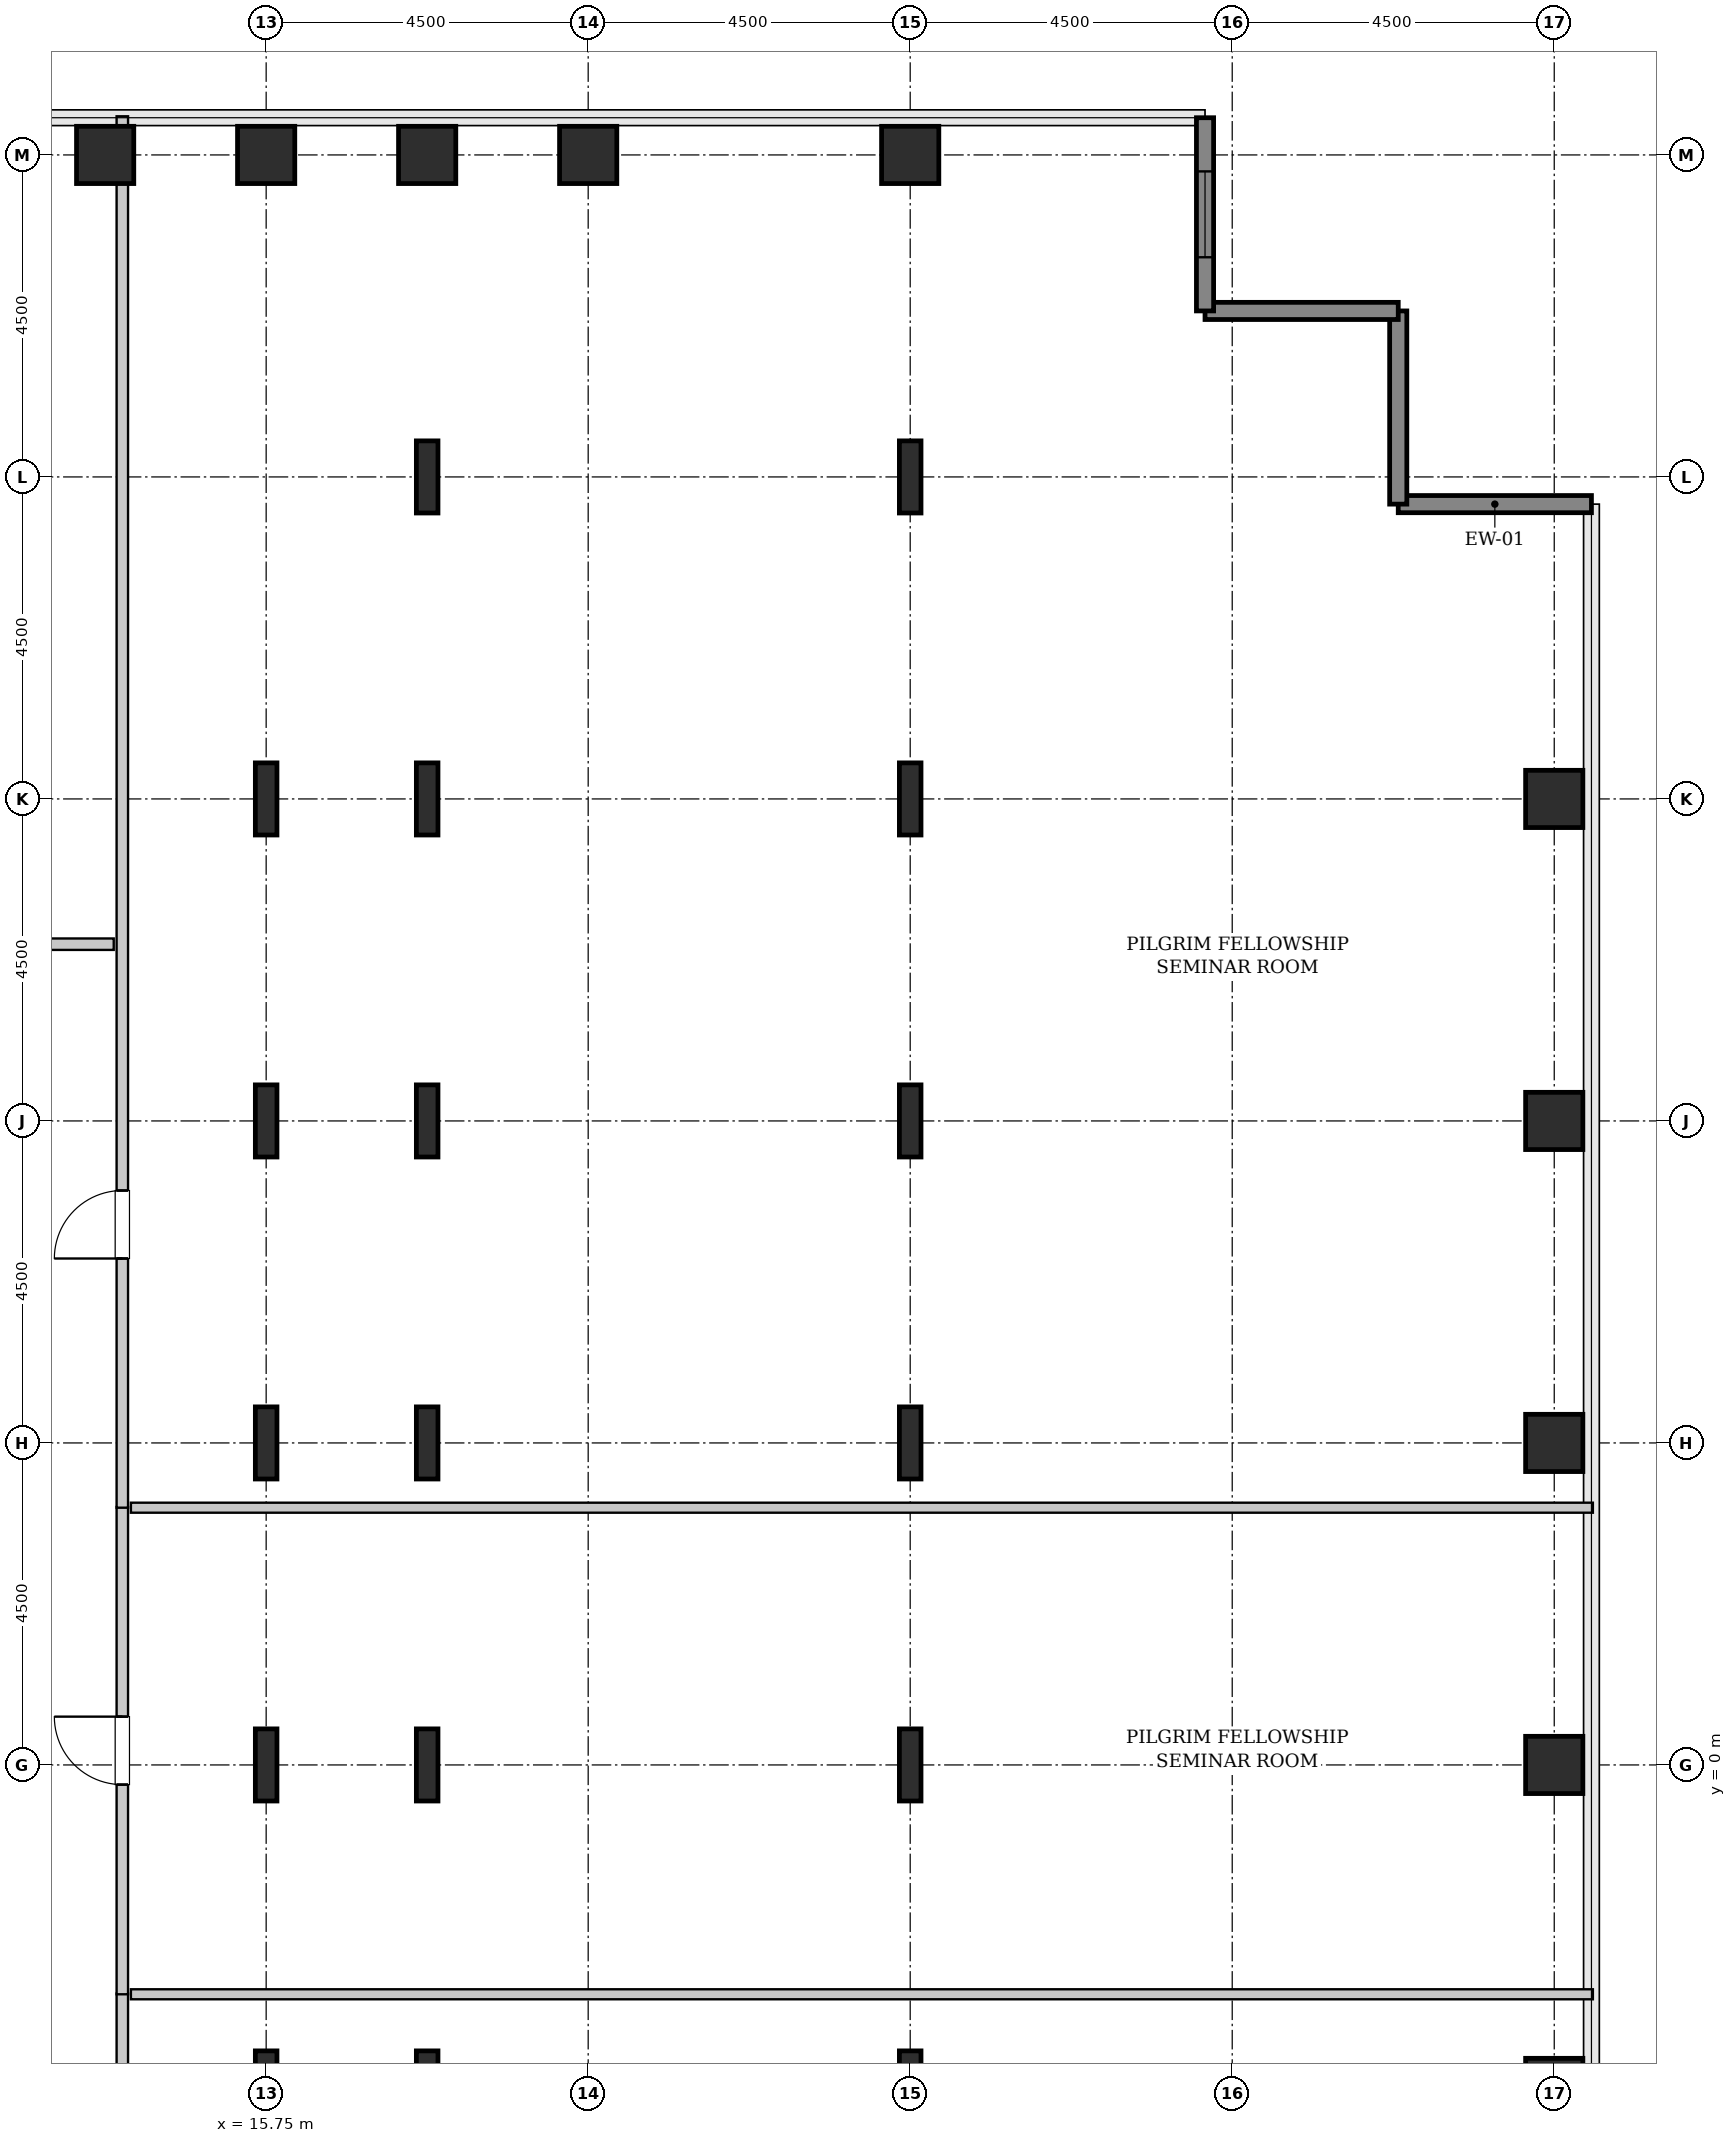
"""IFC4 building model, lengths in metres.
Left out: names, types, materials, properties, quantities, classifications, styles, units other than length and angle.
Written with IfcOpenShell. Run it as: python <this file> out.ifc"""

import sys

from ifc_helpers import new_model, si_unit, direction, frame, frame_2d, origin, origin_2d, place, context, subcontext, project, spatial, rectangle, hollow_rectangle, i_section, extrude, source, transform, mapped, element, fill, save


model = new_model("IFC4")
c1 = context("Model", 3, precision=1e-05, world=origin(), true_north=direction((0.0, 1.0)))
c2 = subcontext(c1, "Body", "Model", "MODEL_VIEW")
j1 = project(units=[si_unit("LENGTHUNIT", "METRE"), si_unit("PLANEANGLEUNIT", "RADIAN")], contexts=[c1])
p1 = place(None, origin())
s1 = spatial("IfcSite", under=j1, at=p1, CompositionType="ELEMENT")
p2 = place(p1, origin())
s2 = spatial("IfcBuilding", under=s1, at=p2, CompositionType="ELEMENT")
p3 = place(p2, frame((0.0, 0.0, 109.8)))
s3 = spatial("IfcBuildingStorey", under=s2, at=p3, CompositionType="ELEMENT", Elevation=109.8)
m1 = source(origin(), c2, "Body", "SweptSolid", [
    extrude(hollow_rectangle(XDim=0.8, YDim=0.8, WallThickness=0.04, InnerFilletRadius=0.04, OuterFilletRadius=0.08, at=origin_2d()), origin(), (0.0, 0.0, 1.0), 3.8),
])
p4 = place(p3, frame((13.5, 22.5, 0.0), z_axis=(0.0, 0.0, 1.0), x_axis=(1.0, 0.0, 0.0)))
e1 = element("IfcColumn", 1, at=p4, inside=s3, PredefinedType="COLUMN", context=c2, shape_type="MappedRepresentation", body=[
    mapped(m1, transform((0.0, 0.0, 0.0), x_axis=(1.0, 0.0, 0.0), y_axis=(0.0, 1.0, 0.0), z_axis=(0.0, 0.0, 1.0), scale=1.0)),
])
m2 = source(origin(), c2, "Body", "SweptSolid", [
    extrude(i_section(OverallWidth=0.302, OverallDepth=1.008, WebThickness=0.021, FlangeThickness=0.04, FilletRadius=0.03, at=origin_2d()), origin(), (0.0, 0.0, 1.0), 3.8),
])
for number, where, z_axis, x_axis in (
    (2, (15.75, -4.5, 0.0), (0.0, 0.0, 1.0), (1.0, 0.0, 0.0)),
    (3, (15.75, 0.0, 0.0), (0.0, 0.0, 1.0), (1.0, 0.0, 0.0)),
    (4, (15.75, 4.5, 0.0), (0.0, 0.0, 1.0), (1.0, 0.0, 0.0)),
    (5, (15.75, 9.0, 0.0), (0.0, 0.0, 1.0), (1.0, 0.0, 0.0)),
    (6, (15.75, 13.5, 0.0), (0.0, 0.0, 1.0), (1.0, 0.0, 0.0)),
):
    element("IfcColumn", number, at=place(p3, frame(where, z_axis=z_axis, x_axis=x_axis)), inside=s3, PredefinedType="COLUMN", context=c2, shape_type="MappedRepresentation", body=[
        mapped(m2, transform((0.0, 0.0, 0.0), x_axis=(1.0, 0.0, 0.0), y_axis=(0.0, 1.0, 0.0), z_axis=(0.0, 0.0, 1.0), scale=1.0)),
    ])
p5 = place(p3, frame((15.75, 22.5, 0.0), z_axis=(0.0, 0.0, 1.0), x_axis=(1.0, 0.0, 0.0)))
e7 = element("IfcColumn", 7, at=p5, inside=s3, PredefinedType="COLUMN", context=c2, shape_type="MappedRepresentation", body=[
    mapped(m1, transform((0.0, 0.0, 0.0), x_axis=(1.0, 0.0, 0.0), y_axis=(0.0, 1.0, 0.0), z_axis=(0.0, 0.0, 1.0), scale=1.0)),
])
for number, where, z_axis, x_axis in (
    (8, (18.0, -4.5, 0.0), (0.0, 0.0, 1.0), (1.0, 0.0, 0.0)),
    (9, (18.0, 0.0, 0.0), (0.0, 0.0, 1.0), (1.0, 0.0, 0.0)),
    (10, (18.0, 4.5, 0.0), (0.0, 0.0, 1.0), (1.0, 0.0, 0.0)),
    (11, (18.0, 9.0, 0.0), (0.0, 0.0, 1.0), (1.0, 0.0, 0.0)),
    (12, (18.0, 13.5, 0.0), (0.0, 0.0, 1.0), (1.0, 0.0, 0.0)),
    (13, (18.0, 18.0, 0.0), (0.0, 0.0, 1.0), (1.0, 0.0, 0.0)),
):
    element("IfcColumn", number, at=place(p3, frame(where, z_axis=z_axis, x_axis=x_axis)), inside=s3, PredefinedType="COLUMN", context=c2, shape_type="MappedRepresentation", body=[
        mapped(m2, transform((0.0, 0.0, 0.0), x_axis=(1.0, 0.0, 0.0), y_axis=(0.0, 1.0, 0.0), z_axis=(0.0, 0.0, 1.0), scale=1.0)),
    ])
for number, where, z_axis, x_axis in (
    (14, (18.0, 22.5, 0.0), (0.0, 0.0, 1.0), (1.0, 0.0, 0.0)),
    (15, (20.25, 22.5, 0.0), (0.0, 0.0, 1.0), (1.0, 0.0, 0.0)),
):
    element("IfcColumn", number, at=place(p3, frame(where, z_axis=z_axis, x_axis=x_axis)), inside=s3, PredefinedType="COLUMN", context=c2, shape_type="MappedRepresentation", body=[
        mapped(m1, transform((0.0, 0.0, 0.0), x_axis=(1.0, 0.0, 0.0), y_axis=(0.0, 1.0, 0.0), z_axis=(0.0, 0.0, 1.0), scale=1.0)),
    ])
for number, where, z_axis, x_axis in (
    (16, (24.75, -4.5, 0.0), (0.0, 0.0, 1.0), (1.0, 0.0, 0.0)),
    (17, (24.75, 0.0, 0.0), (0.0, 0.0, 1.0), (1.0, 0.0, 0.0)),
    (18, (24.75, 4.5, 0.0), (0.0, 0.0, 1.0), (1.0, 0.0, 0.0)),
    (19, (24.75, 9.0, 0.0), (0.0, 0.0, 1.0), (1.0, 0.0, 0.0)),
    (20, (24.75, 13.5, 0.0), (0.0, 0.0, 1.0), (1.0, 0.0, 0.0)),
    (21, (24.75, 18.0, 0.0), (0.0, 0.0, 1.0), (1.0, 0.0, 0.0)),
):
    element("IfcColumn", number, at=place(p3, frame(where, z_axis=z_axis, x_axis=x_axis)), inside=s3, PredefinedType="COLUMN", context=c2, shape_type="MappedRepresentation", body=[
        mapped(m2, transform((0.0, 0.0, 0.0), x_axis=(1.0, 0.0, 0.0), y_axis=(0.0, 1.0, 0.0), z_axis=(0.0, 0.0, 1.0), scale=1.0)),
    ])
for number, where, z_axis, x_axis in (
    (22, (24.75, 22.5, 0.0), (0.0, 0.0, 1.0), (1.0, 0.0, 0.0)),
    (23, (33.75, -4.5, 0.0), (0.0, 0.0, 1.0), (1.0, 0.0, 0.0)),
    (24, (33.75, 0.0, 0.0), (0.0, 0.0, 1.0), (1.0, 0.0, 0.0)),
    (25, (33.75, 4.5, 0.0), (0.0, 0.0, 1.0), (1.0, 0.0, 0.0)),
    (26, (33.75, 9.0, 0.0), (0.0, 0.0, 1.0), (1.0, 0.0, 0.0)),
    (27, (33.75, 13.5, 0.0), (0.0, 0.0, 1.0), (1.0, 0.0, 0.0)),
):
    element("IfcColumn", number, at=place(p3, frame(where, z_axis=z_axis, x_axis=x_axis)), inside=s3, PredefinedType="COLUMN", context=c2, shape_type="MappedRepresentation", body=[
        mapped(m1, transform((0.0, 0.0, 0.0), x_axis=(1.0, 0.0, 0.0), y_axis=(0.0, 1.0, 0.0), z_axis=(0.0, 0.0, 1.0), scale=1.0)),
    ])
m3 = source(origin(), c2, "Body", "SweptSolid", [
    extrude(rectangle(XDim=2.7, YDim=0.24, at=frame_2d((1.35, 0.0))), origin(), (0.0, 0.0, 1.0), 3.55),
])
for number, where, z_axis, x_axis in (
    (28, (34.27, 17.62, 0.0), (0.0, 0.0, 1.0), (-1.0, 0.0, 0.0)),
    (29, (31.57, 17.62, 0.0), (0.0, 0.0, 1.0), (0.0, 1.0, 0.0)),
    (30, (31.57, 20.32, 0.0), (0.0, 0.0, 1.0), (-1.0, 0.0, 0.0)),
):
    element("IfcWall", number, at=place(p3, frame(where, z_axis=z_axis, x_axis=x_axis)), inside=s3, PredefinedType="SHEAR", context=c2, shape_type="MappedRepresentation", body=[
        mapped(m3, transform((0.0, 0.0, 0.0), x_axis=(1.0, 0.0, 0.0), y_axis=(0.0, 1.0, 0.0), z_axis=(0.0, 0.0, 1.0), scale=1.0)),
    ])
p6 = place(p3, frame((28.87, 20.32, 0.0), z_axis=(0.0, 0.0, 1.0), x_axis=(0.0, 1.0, 0.0)))
e31 = element("IfcWall", 31, at=p6, inside=s3, PredefinedType="SHEAR", context=c2, shape_type="MappedRepresentation", body=[
    mapped(m3, transform((0.0, 0.0, 0.0), x_axis=(1.0, 0.0, 0.0), y_axis=(0.0, 1.0, 0.0), z_axis=(0.0, 0.0, 1.0), scale=1.0)),
])
p7 = place(p6, frame((0.75, 0.0, 0.85)))
e32 = element("IfcOpeningElement", 32, at=p7, cuts=e31, PredefinedType="OPENING", context=c2, shape_type="SweptSolid", body=[
    extrude(rectangle(XDim=1.2, YDim=1.8, at=frame_2d((0.6, 0.9))), frame((0.0, 0.13, 0.0), z_axis=(0.0, -1.0, 0.0), x_axis=(1.0, 0.0, 0.0)), (0.0, 0.0, 1.0), 0.26),
])
m4 = source(origin(), c2, "Body", "SweptSolid", [
    extrude(rectangle(XDim=19.845, YDim=0.16, at=frame_2d((9.922, 0.0))), origin(), (0.0, 0.0, 1.0), 3.535),
])
p8 = place(p3, frame((13.74, -23.04, 0.0), z_axis=(0.0, 0.0, 1.0), x_axis=(0.0, 1.0, 0.0)))
e33 = element("IfcWall", 33, at=p8, inside=s3, PredefinedType="PARTITIONING", context=c2, shape_type="MappedRepresentation", body=[
    mapped(m4, transform((0.0, 0.0, 0.0), x_axis=(1.0, 0.0, 0.0), y_axis=(0.0, 1.0, 0.0), z_axis=(0.0, 0.0, 1.0), scale=1.0)),
])
p9 = place(p8, frame((15.212, 0.0, 0.0)))
e34 = element("IfcOpeningElement", 34, at=p9, cuts=e33, PredefinedType="OPENING", context=c2, shape_type="SweptSolid", body=[
    extrude(rectangle(XDim=0.95, YDim=2.1, at=frame_2d((0.475, 1.05))), frame((0.0, 0.09, 0.0), z_axis=(0.0, -1.0, 0.0), x_axis=(1.0, 0.0, 0.0)), (0.0, 0.0, 1.0), 0.18),
])
m5 = source(origin(), c2, "Body", "SweptSolid", [
    extrude(rectangle(XDim=20.43, YDim=0.14, at=frame_2d((10.215, 0.0))), origin(), (0.0, 0.0, 1.0), 3.535),
])
p10 = place(p3, frame((13.86, -3.205, 0.0), z_axis=(0.0, 0.0, 1.0), x_axis=(1.0, 0.0, 0.0)))
e35 = element("IfcWall", 35, at=p10, inside=s3, PredefinedType="PARTITIONING", context=c2, shape_type="MappedRepresentation", body=[
    mapped(m5, transform((0.0, 0.0, 0.0), x_axis=(1.0, 0.0, 0.0), y_axis=(0.0, 1.0, 0.0), z_axis=(0.0, 0.0, 1.0), scale=1.0)),
])
m6 = source(origin(), c2, "Body", "SweptSolid", [
    extrude(rectangle(XDim=6.81, YDim=0.16, at=frame_2d((3.405, 0.0))), origin(), (0.0, 0.0, 1.0), 3.535),
])
p11 = place(p3, frame((13.74, -3.205, 0.0), z_axis=(0.0, 0.0, 1.0), x_axis=(0.0, 1.0, 0.0)))
e36 = element("IfcWall", 36, at=p11, inside=s3, PredefinedType="PARTITIONING", context=c2, shape_type="MappedRepresentation", body=[
    mapped(m6, transform((0.0, 0.0, 0.0), x_axis=(1.0, 0.0, 0.0), y_axis=(0.0, 1.0, 0.0), z_axis=(0.0, 0.0, 1.0), scale=1.0)),
])
p12 = place(p11, frame((2.93, 0.0, 0.0)))
e37 = element("IfcOpeningElement", 37, at=p12, cuts=e36, PredefinedType="OPENING", context=c2, shape_type="SweptSolid", body=[
    extrude(rectangle(XDim=0.95, YDim=2.1, at=frame_2d((0.475, 1.05))), frame((0.0, 0.09, 0.0), z_axis=(0.0, -1.0, 0.0), x_axis=(1.0, 0.0, 0.0)), (0.0, 0.0, 1.0), 0.18),
])
p13 = place(p3, frame((13.86, 3.595, 0.0), z_axis=(0.0, 0.0, 1.0), x_axis=(1.0, 0.0, 0.0)))
e38 = element("IfcWall", 38, at=p13, inside=s3, PredefinedType="PARTITIONING", context=c2, shape_type="MappedRepresentation", body=[
    mapped(m5, transform((0.0, 0.0, 0.0), x_axis=(1.0, 0.0, 0.0), y_axis=(0.0, 1.0, 0.0), z_axis=(0.0, 0.0, 1.0), scale=1.0)),
])
m7 = source(origin(), c2, "Body", "SweptSolid", [
    extrude(rectangle(XDim=19.445, YDim=0.16, at=frame_2d((9.723, 0.0))), origin(), (0.0, 0.0, 1.0), 3.535),
])
p14 = place(p3, frame((13.74, 3.595, 0.0), z_axis=(0.0, 0.0, 1.0), x_axis=(0.0, 1.0, 0.0)))
e39 = element("IfcWall", 39, at=p14, inside=s3, PredefinedType="PARTITIONING", context=c2, shape_type="MappedRepresentation", body=[
    mapped(m7, transform((0.0, 0.0, 0.0), x_axis=(1.0, 0.0, 0.0), y_axis=(0.0, 1.0, 0.0), z_axis=(0.0, 0.0, 1.0), scale=1.0)),
])
p15 = place(p14, frame((3.482, 0.0, 0.0)))
e40 = element("IfcOpeningElement", 40, at=p15, cuts=e39, PredefinedType="OPENING", context=c2, shape_type="SweptSolid", body=[
    extrude(rectangle(XDim=0.95, YDim=2.1, at=frame_2d((0.475, 1.05))), frame((0.0, 0.09, 0.0), z_axis=(0.0, -1.0, 0.0), x_axis=(1.0, 0.0, 0.0)), (0.0, 0.0, 1.0), 0.18),
])
m8 = source(origin(), c2, "Body", "SweptSolid", [
    extrude(rectangle(XDim=7.66, YDim=0.16, at=frame_2d((3.83, 0.0))), origin(), (0.0, 0.0, 1.0), 3.535),
])
p16 = place(p3, frame((5.96, 11.47, 0.0), z_axis=(0.0, 0.0, 1.0), x_axis=(1.0, 0.0, 0.0)))
e41 = element("IfcWall", 41, at=p16, inside=s3, PredefinedType="PARTITIONING", context=c2, shape_type="MappedRepresentation", body=[
    mapped(m8, transform((0.0, 0.0, 0.0), x_axis=(1.0, 0.0, 0.0), y_axis=(0.0, 1.0, 0.0), z_axis=(0.0, 0.0, 1.0), scale=1.0)),
])
p17 = place(p16, frame((3.355, 0.0, 0.0)))
e42 = element("IfcOpeningElement", 42, at=p17, cuts=e41, PredefinedType="OPENING", context=c2, shape_type="SweptSolid", body=[
    extrude(rectangle(XDim=0.95, YDim=2.1, at=frame_2d((0.475, 1.05))), frame((0.0, 0.09, 0.0), z_axis=(0.0, -1.0, 0.0), x_axis=(1.0, 0.0, 0.0)), (0.0, 0.0, 1.0), 0.18),
])
m9 = source(origin(), c2, "Body", "SweptSolid", [
    extrude(rectangle(XDim=1.2, YDim=1.8, at=frame_2d((0.6, 0.9))), frame((0.0, 0.03, 0.0), z_axis=(0.0, -1.0, 0.0), x_axis=(1.0, 0.0, 0.0)), (0.0, 0.0, 1.0), 0.06),
])
p18 = place(p7, origin())
e43 = element("IfcWindow", 43, at=p18, inside=s3, PartitioningType="SINGLE_PANEL", PredefinedType="WINDOW", context=c2, shape_type="MappedRepresentation", body=[
    mapped(m9, transform((0.0, 0.0, 0.0), x_axis=(1.0, 0.0, 0.0), y_axis=(0.0, 1.0, 0.0), z_axis=(0.0, 0.0, 1.0), scale=1.0)),
])
fill(e32, e43)
m10 = source(origin(), c2, "Body", "SweptSolid", [
    extrude(rectangle(XDim=0.95, YDim=2.1, at=frame_2d((0.475, 1.05))), frame((0.0, 0.025, 0.0), z_axis=(0.0, -1.0, 0.0), x_axis=(1.0, 0.0, 0.0)), (0.0, 0.0, 1.0), 0.05),
])
p19 = place(p12, origin())
e44 = element("IfcDoor", 44, at=p19, inside=s3, OperationType="SINGLE_SWING_RIGHT", PredefinedType="DOOR", context=c2, shape_type="MappedRepresentation", body=[
    mapped(m10, transform((0.0, 0.0, 0.0), x_axis=(1.0, 0.0, 0.0), y_axis=(0.0, 1.0, 0.0), z_axis=(0.0, 0.0, 1.0), scale=1.0)),
])
fill(e37, e44)
p20 = place(p15, origin())
e45 = element("IfcDoor", 45, at=p20, inside=s3, OperationType="SINGLE_SWING_LEFT", PredefinedType="DOOR", context=c2, shape_type="MappedRepresentation", body=[
    mapped(m10, transform((0.0, 0.0, 0.0), x_axis=(1.0, 0.0, 0.0), y_axis=(0.0, 1.0, 0.0), z_axis=(0.0, 0.0, 1.0), scale=1.0)),
])
fill(e40, e45)
save(model, sys.argv[1])
